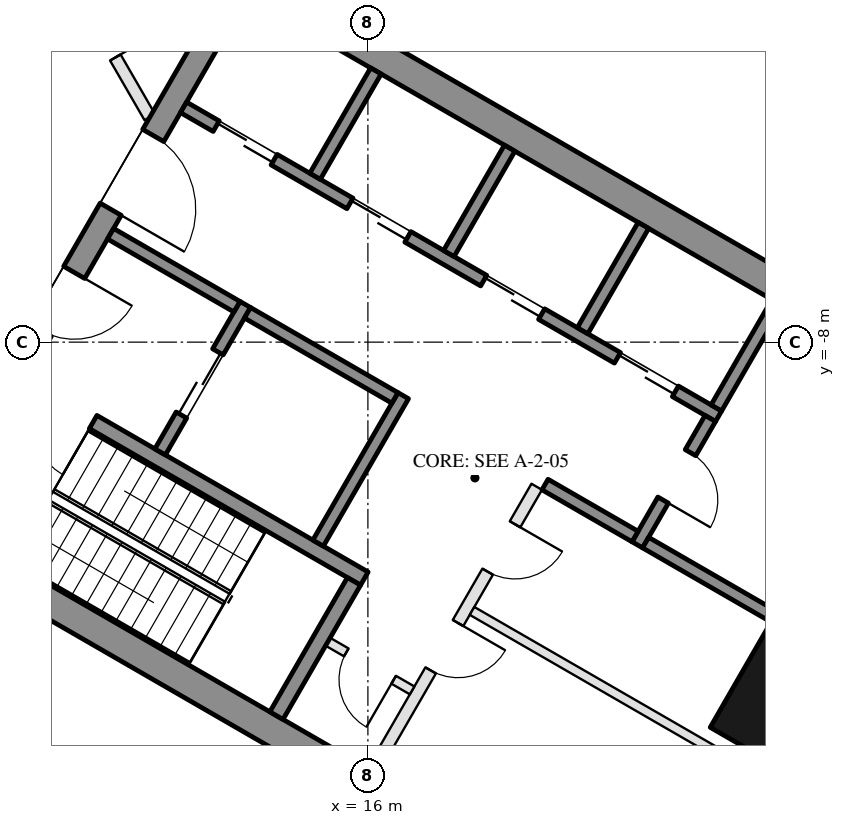
"""IFC4 building model, lengths in metres.
Left out: names, types, materials, properties, quantities, classifications, styles, units other than length and angle.
Written with IfcOpenShell. Run it as: python <this file> out.ifc"""

import sys

from ifc_helpers import new_model, si_unit, direction, frame, frame_2d, origin, origin_2d, place, context, subcontext, project, spatial, rectangle, hollow_rectangle, extrude, element, fill, save


model = new_model("IFC4")
c1 = context("Model", 3, precision=1e-05, world=origin(), true_north=direction((0.0, 1.0)))
c2 = subcontext(c1, "Body", "Model", "MODEL_VIEW")
j1 = project(units=[si_unit("LENGTHUNIT", "METRE"), si_unit("PLANEANGLEUNIT", "RADIAN")], contexts=[c1])
p1 = place(None, origin())
s1 = spatial("IfcSite", under=j1, at=p1, CompositionType="ELEMENT")
p2 = place(p1, origin())
s2 = spatial("IfcBuilding", under=s1, at=p2, CompositionType="ELEMENT")
p3 = place(p2, frame((0.0, 0.0, 28.5)))
s3 = spatial("IfcBuildingStorey", under=s2, at=p3, CompositionType="ELEMENT", Elevation=28.5)
p4 = place(p3, frame((23.556, -13.6, 0.0), z_axis=(0.0, 0.0, 1.0), x_axis=(0.5, 0.866025403784, 0.0)))
e1 = element("IfcColumn", 1, at=p4, inside=s3, PredefinedType="COLUMN", context=c2, shape_type="SweptSolid", body=[
    extrude(hollow_rectangle(XDim=3.2, YDim=2.6, WallThickness=0.08, at=origin_2d()), origin(), (0.0, 0.0, 1.0), 4.5),
])
for number, where, z_axis, x_axis in (
    (2, (8.547, -10.997, 0.0), (0.0, 0.0, 1.0), (0.866, -0.5, 0.0)),
    (3, (13.797, -1.903, 0.0), (0.0, 0.0, 1.0), (0.866, -0.5, 0.0)),
):
    element("IfcWall", number, at=place(p3, frame(where, z_axis=z_axis, x_axis=x_axis)), inside=s3, PredefinedType="SHEAR", context=c2, shape_type="SweptSolid", body=[
        extrude(rectangle(XDim=15.13, YDim=0.5, at=frame_2d((7.565, 0.0))), origin(), (0.0, 0.0, 1.0), 4.2),
    ])
p5 = place(p3, frame((8.845, -10.88, 0.0), z_axis=(0.0, 0.0, 1.0), x_axis=(0.500004234368, 0.866022959057, 0.0)))
e4 = element("IfcWall", 4, at=p5, inside=s3, PredefinedType="SHEAR", context=c2, shape_type="SweptSolid", body=[
    extrude(rectangle(XDim=10.0, YDim=0.4, at=frame_2d((5.0, 0.0))), origin(), (0.0, 0.0, 1.0), 4.2),
])
p6 = place(p5, frame((3.55, 0.0, 0.0)))
e5 = element("IfcOpeningElement", 5, at=p6, cuts=e4, PredefinedType="OPENING", context=c2, shape_type="SweptSolid", body=[
    extrude(rectangle(XDim=1.1, YDim=2.1, at=frame_2d((0.55, 1.05))), frame((0.0, 0.21, 0.0), z_axis=(0.0, -1.0, 0.0), x_axis=(1.0, 0.0, 0.0)), (0.0, 0.0, 1.0), 0.42),
])
p7 = place(p5, frame((5.85, 0.0, 0.0)))
e6 = element("IfcOpeningElement", 6, at=p7, cuts=e4, PredefinedType="OPENING", context=c2, shape_type="SweptSolid", body=[
    extrude(rectangle(XDim=1.4, YDim=2.1, at=frame_2d((0.7, 1.05))), frame((0.0, 0.21, 0.0), z_axis=(0.0, -1.0, 0.0), x_axis=(1.0, 0.0, 0.0)), (0.0, 0.0, 1.0), 0.42),
])
p8 = place(p3, frame((10.356, -8.664, 0.0), z_axis=(0.0, 0.0, 1.0), x_axis=(0.866028629588, -0.499994412703, 0.0)))
e7 = element("IfcWall", 7, at=p8, inside=s3, PredefinedType="SHEAR", context=c2, shape_type="SweptSolid", body=[
    extrude(rectangle(XDim=6.45, YDim=0.25, at=frame_2d((3.225, 0.0))), origin(), (0.0, 0.0, 1.0), 4.2),
])
p9 = place(p8, frame((0.3, 0.0, 0.0)))
e8 = element("IfcOpeningElement", 8, at=p9, cuts=e7, PredefinedType="OPENING", context=c2, shape_type="SweptSolid", body=[
    extrude(rectangle(XDim=1.0, YDim=2.1, at=frame_2d((0.5, 1.05))), frame((0.0, 0.135, 0.0), z_axis=(0.0, -1.0, 0.0), x_axis=(1.0, 0.0, 0.0)), (0.0, 0.0, 1.0), 0.27),
])
p10 = place(p3, frame((14.496, -14.143, 0.0), z_axis=(0.0, 0.0, 1.0), x_axis=(0.500062241894, 0.865989465428, 0.0)))
e9 = element("IfcWall", 9, at=p10, inside=s3, PredefinedType="SHEAR", context=c2, shape_type="SweptSolid", body=[
    extrude(rectangle(XDim=2.55, YDim=0.25, at=frame_2d((1.275, 0.0))), origin(), (0.0, 0.0, 1.0), 4.2),
])
p11 = place(p3, frame((15.181, -11.305, 0.0), z_axis=(0.0, 0.0, 1.0), x_axis=(0.49994636267, 0.866056369097, 0.0)))
e10 = element("IfcWall", 10, at=p11, inside=s3, PredefinedType="SHEAR", context=c2, shape_type="SweptSolid", body=[
    extrude(rectangle(XDim=2.8, YDim=0.2, at=frame_2d((1.4, 0.0))), origin(), (0.0, 0.0, 1.0), 4.2),
])
p12 = place(p3, frame((12.583, -9.805, 0.0), z_axis=(0.0, 0.0, 1.0), x_axis=(0.49994636267, 0.866056369097, 0.0)))
e11 = element("IfcWall", 11, at=p12, inside=s3, PredefinedType="SHEAR", context=c2, shape_type="SweptSolid", body=[
    extrude(rectangle(XDim=2.8, YDim=0.2, at=frame_2d((1.4, 0.0))), origin(), (0.0, 0.0, 1.0), 4.2),
])
p13 = place(p12, frame((0.7, 0.0, 0.0)))
e12 = element("IfcOpeningElement", 12, at=p13, cuts=e11, PredefinedType="OPENING", context=c2, shape_type="SweptSolid", body=[
    extrude(rectangle(XDim=1.2, YDim=2.1, at=frame_2d((0.6, 1.05))), frame((0.0, 0.11, 0.0), z_axis=(0.0, -1.0, 0.0), x_axis=(1.0, 0.0, 0.0)), (0.0, 0.0, 1.0), 0.22),
])
p14 = place(p3, frame((11.768, -6.217, 0.0), z_axis=(0.0, 0.0, 1.0), x_axis=(0.866050077142, -0.499957262057, 0.0)))
e13 = element("IfcWall", 13, at=p14, inside=s3, PredefinedType="SHEAR", context=c2, shape_type="SweptSolid", body=[
    extrude(rectangle(XDim=2.4, YDim=0.2, at=frame_2d((1.2, 0.0))), origin(), (0.0, 0.0, 1.0), 4.2),
])
p15 = place(p3, frame((14.02, -7.517, 0.0), z_axis=(0.0, 0.0, 1.0), x_axis=(0.866034573852, -0.49998411664, 0.0)))
e14 = element("IfcWall", 14, at=p15, inside=s3, PredefinedType="SHEAR", context=c2, shape_type="SweptSolid", body=[
    extrude(rectangle(XDim=2.8, YDim=0.2, at=frame_2d((1.4, 0.0))), origin(), (0.0, 0.0, 1.0), 4.2),
])
p16 = place(p3, frame((12.968, -4.138, 0.0), z_axis=(0.0, 0.0, 1.0), x_axis=(0.866028328073, -0.49999493495, 0.0)))
e15 = element("IfcWall", 15, at=p16, inside=s3, PredefinedType="SHEAR", context=c2, shape_type="SweptSolid", body=[
    extrude(rectangle(XDim=10.16, YDim=0.2, at=frame_2d((5.08, 0.0))), origin(), (0.0, 0.0, 1.0), 4.2),
])
p17 = place(p16, frame((0.62, 0.0, 0.0)))
e16 = element("IfcOpeningElement", 16, at=p17, cuts=e15, PredefinedType="OPENING", context=c2, shape_type="SweptSolid", body=[
    extrude(rectangle(XDim=1.1, YDim=2.1, at=frame_2d((0.55, 1.05))), frame((0.0, 0.11, 0.0), z_axis=(0.0, -1.0, 0.0), x_axis=(1.0, 0.0, 0.0)), (0.0, 0.0, 1.0), 0.22),
])
p18 = place(p16, frame((3.16, 0.0, 0.0)))
e17 = element("IfcOpeningElement", 17, at=p18, cuts=e15, PredefinedType="OPENING", context=c2, shape_type="SweptSolid", body=[
    extrude(rectangle(XDim=1.1, YDim=2.1, at=frame_2d((0.55, 1.05))), frame((0.0, 0.11, 0.0), z_axis=(0.0, -1.0, 0.0), x_axis=(1.0, 0.0, 0.0)), (0.0, 0.0, 1.0), 0.22),
])
p19 = place(p16, frame((5.7, 0.0, 0.0)))
e18 = element("IfcOpeningElement", 18, at=p19, cuts=e15, PredefinedType="OPENING", context=c2, shape_type="SweptSolid", body=[
    extrude(rectangle(XDim=1.1, YDim=2.1, at=frame_2d((0.55, 1.05))), frame((0.0, 0.11, 0.0), z_axis=(0.0, -1.0, 0.0), x_axis=(1.0, 0.0, 0.0)), (0.0, 0.0, 1.0), 0.22),
])
p20 = place(p16, frame((8.24, 0.0, 0.0)))
e19 = element("IfcOpeningElement", 19, at=p20, cuts=e15, PredefinedType="OPENING", context=c2, shape_type="SweptSolid", body=[
    extrude(rectangle(XDim=1.1, YDim=2.1, at=frame_2d((0.55, 1.05))), frame((0.0, 0.11, 0.0), z_axis=(0.0, -1.0, 0.0), x_axis=(1.0, 0.0, 0.0)), (0.0, 0.0, 1.0), 0.22),
])
p21 = place(p3, frame((20.43, -11.333, 0.0), z_axis=(0.0, 0.0, 1.0), x_axis=(0.500001309137, 0.866024647952, 0.0)))
e20 = element("IfcWall", 20, at=p21, inside=s3, PredefinedType="SHEAR", context=c2, shape_type="SweptSolid", body=[
    extrude(rectangle(XDim=2.4, YDim=0.2, at=frame_2d((1.2, 0.0))), origin(), (0.0, 0.0, 1.0), 4.2),
])
p22 = place(p21, frame((0.85, 0.0, 0.0)))
e21 = element("IfcOpeningElement", 21, at=p22, cuts=e20, PredefinedType="OPENING", context=c2, shape_type="SweptSolid", body=[
    extrude(rectangle(XDim=0.9, YDim=2.1, at=frame_2d((0.45, 1.05))), frame((0.0, 0.11, 0.0), z_axis=(0.0, -1.0, 0.0), x_axis=(1.0, 0.0, 0.0)), (0.0, 0.0, 1.0), 0.22),
])
p23 = place(p3, frame((18.913, -10.342, 0.0), z_axis=(0.0, 0.0, 1.0), x_axis=(0.866038183914, -0.499977863513, 0.0)))
e22 = element("IfcWall", 22, at=p23, inside=s3, PredefinedType="SHEAR", context=c2, shape_type="SweptSolid", body=[
    extrude(rectangle(XDim=1.71, YDim=0.2, at=frame_2d((0.855, 0.0))), origin(), (0.0, 0.0, 1.0), 4.2),
])
for number, where, z_axis, x_axis in (
    (23, (15.131, -5.272, 0.0), (0.0, 0.0, 1.0), (0.5, 0.866, 0.0)),
    (24, (17.331, -6.542, 0.0), (0.0, 0.0, 1.0), (0.5, 0.866, 0.0)),
    (25, (19.531, -7.812, 0.0), (0.0, 0.0, 1.0), (0.5, 0.866, 0.0)),
    (26, (21.73, -9.082, 0.0), (0.0, 0.0, 1.0), (0.5, 0.866, 0.0)),
):
    element("IfcWall", number, at=place(p3, frame(where, z_axis=z_axis, x_axis=x_axis)), inside=s3, PredefinedType="SHEAR", context=c2, shape_type="SweptSolid", body=[
        extrude(rectangle(XDim=2.0, YDim=0.2, at=frame_2d((1.0, 0.0))), origin(), (0.0, 0.0, 1.0), 4.2),
    ])
p24 = place(p3, frame((20.567, -11.297, 0.0), z_axis=(0.0, 0.0, 1.0), x_axis=(0.866048967903, -0.499959183527, 0.0)))
e27 = element("IfcWall", 27, at=p24, inside=s3, PredefinedType="SHEAR", context=c2, shape_type="SweptSolid", body=[
    extrude(rectangle(XDim=2.44, YDim=0.2, at=frame_2d((1.22, 0.0))), origin(), (0.0, 0.0, 1.0), 4.2),
])
p25 = place(p3, frame((16.076, -15.055, 0.0), z_axis=(0.0, 0.0, 1.0), x_axis=(0.499995103361, 0.866028230842, 0.0)))
e28 = element("IfcWall", 28, at=p25, inside=s3, PredefinedType="PARTITIONING", context=c2, shape_type="SweptSolid", body=[
    extrude(rectangle(XDim=5.4, YDim=0.2, at=frame_2d((2.7, 0.0))), origin(), (0.0, 0.0, 1.0), 4.2),
])
p26 = place(p25, frame((1.913, 0.0, 0.0)))
e29 = element("IfcOpeningElement", 29, at=p26, cuts=e28, PredefinedType="OPENING", context=c2, shape_type="SweptSolid", body=[
    extrude(rectangle(XDim=0.9, YDim=2.1, at=frame_2d((0.45, 1.05))), frame((0.0, 0.11, 0.0), z_axis=(0.0, -1.0, 0.0), x_axis=(1.0, 0.0, 0.0)), (0.0, 0.0, 1.0), 0.22),
])
p27 = place(p25, frame((3.788, 0.0, 0.0)))
e30 = element("IfcOpeningElement", 30, at=p27, cuts=e28, PredefinedType="OPENING", context=c2, shape_type="SweptSolid", body=[
    extrude(rectangle(XDim=0.9, YDim=2.1, at=frame_2d((0.45, 1.05))), frame((0.0, 0.11, 0.0), z_axis=(0.0, -1.0, 0.0), x_axis=(1.0, 0.0, 0.0)), (0.0, 0.0, 1.0), 0.22),
])
p28 = place(p3, frame((15.342, -12.928, 0.0), z_axis=(0.0, 0.0, 1.0), x_axis=(0.865989903783, -0.500061482766, 0.0)))
e31 = element("IfcWall", 31, at=p28, inside=s3, PredefinedType="PARTITIONING", context=c2, shape_type="SweptSolid", body=[
    extrude(rectangle(XDim=1.6, YDim=0.15, at=frame_2d((0.8, 0.0))), origin(), (0.0, 0.0, 1.0), 4.2),
])
p29 = place(p28, frame((0.35, 0.0, 0.0)))
e32 = element("IfcOpeningElement", 32, at=p29, cuts=e31, PredefinedType="OPENING", context=c2, shape_type="SweptSolid", body=[
    extrude(rectangle(XDim=0.9, YDim=2.1, at=frame_2d((0.45, 1.05))), frame((0.0, 0.085, 0.0), z_axis=(0.0, -1.0, 0.0), x_axis=(1.0, 0.0, 0.0)), (0.0, 0.0, 1.0), 0.17),
])
p30 = place(p3, frame((17.713, -12.42, 0.0), z_axis=(0.0, 0.0, 1.0), x_axis=(0.866027924134, -0.499995634601, 0.0)))
e33 = element("IfcWall", 33, at=p30, inside=s3, PredefinedType="PARTITIONING", context=c2, shape_type="SweptSolid", body=[
    extrude(rectangle(XDim=6.55, YDim=0.15, at=frame_2d((3.275, 0.0))), origin(), (0.0, 0.0, 1.0), 4.2),
])
p31 = place(p3, frame((12.413, -4.3, 0.0), z_axis=(0.0, 0.0, 1.0), x_axis=(-0.50000478328, 0.866022642139, 0.0)))
e34 = element("IfcWall", 34, at=p31, inside=s3, PredefinedType="PARTITIONING", context=c2, shape_type="SweptSolid", body=[
    extrude(rectangle(XDim=19.861, YDim=0.2, at=frame_2d((9.931, 0.0))), origin(), (0.0, 0.0, 1.0), 3.41),
])
p32 = place(p31, frame((1.134, 0.0, 0.0)))
e35 = element("IfcOpeningElement", 35, at=p32, cuts=e34, PredefinedType="OPENING", context=c2, shape_type="SweptSolid", body=[
    extrude(rectangle(XDim=1.2, YDim=2.1, at=frame_2d((0.6, 1.05))), frame((0.0, 0.11, 0.0), z_axis=(0.0, -1.0, 0.0), x_axis=(1.0, 0.0, 0.0)), (0.0, 0.0, 1.0), 0.22),
])
p33 = place(p31, frame((16.89, 0.0, 0.0)))
e36 = element("IfcOpeningElement", 36, at=p33, cuts=e34, PredefinedType="OPENING", context=c2, shape_type="SweptSolid", body=[
    extrude(rectangle(XDim=1.8, YDim=2.4, at=frame_2d((0.9, 1.2))), frame((0.0, 0.11, 0.0), z_axis=(0.0, -1.0, 0.0), x_axis=(1.0, 0.0, 0.0)), (0.0, 0.0, 1.0), 0.22),
])
p34 = place(p31, frame((13.23, 0.0, 0.0)))
e37 = element("IfcOpeningElement", 37, at=p34, cuts=e34, PredefinedType="OPENING", context=c2, shape_type="SweptSolid", body=[
    extrude(rectangle(XDim=1.8, YDim=2.1, at=frame_2d((0.9, 1.05))), frame((0.0, 0.11, 0.0), z_axis=(0.0, -1.0, 0.0), x_axis=(1.0, 0.0, 0.0)), (0.0, 0.0, 1.0), 0.22),
])
p35 = place(p31, frame((7.168, 0.0, 0.0)))
e38 = element("IfcOpeningElement", 38, at=p35, cuts=e34, PredefinedType="OPENING", context=c2, shape_type="SweptSolid", body=[
    extrude(rectangle(XDim=1.0, YDim=2.1, at=frame_2d((0.5, 1.05))), frame((0.0, 0.11, 0.0), z_axis=(0.0, -1.0, 0.0), x_axis=(1.0, 0.0, 0.0)), (0.0, 0.0, 1.0), 0.22),
])
p36 = place(p13, origin())
e39 = element("IfcDoor", 39, at=p36, inside=s3, OperationType="DOUBLE_DOOR_SLIDING", PredefinedType="DOOR", context=c2, shape_type="SweptSolid", body=[
    extrude(rectangle(XDim=1.2, YDim=2.1, at=frame_2d((0.6, 1.05))), frame((0.0, 0.025, 0.0), z_axis=(0.0, -1.0, 0.0), x_axis=(1.0, 0.0, 0.0)), (0.0, 0.0, 1.0), 0.05),
])
fill(e12, e39)
p37 = place(p29, frame((0.9, 0.0, 0.0), z_axis=(0.0, 0.0, 1.0), x_axis=(-1.0, 0.0, 0.0)))
e40 = element("IfcDoor", 40, at=p37, inside=s3, OperationType="SINGLE_SWING_LEFT", PredefinedType="DOOR", context=c2, shape_type="SweptSolid", body=[
    extrude(rectangle(XDim=0.9, YDim=2.1, at=frame_2d((0.45, 1.05))), frame((0.0, 0.025, 0.0), z_axis=(0.0, -1.0, 0.0), x_axis=(1.0, 0.0, 0.0)), (0.0, 0.0, 1.0), 0.05),
])
fill(e32, e40)
p38 = place(p17, origin())
e41 = element("IfcDoor", 41, at=p38, inside=s3, OperationType="DOUBLE_DOOR_SLIDING", PredefinedType="DOOR", context=c2, shape_type="SweptSolid", body=[
    extrude(rectangle(XDim=1.1, YDim=2.1, at=frame_2d((0.55, 1.05))), frame((0.0, 0.025, 0.0), z_axis=(0.0, -1.0, 0.0), x_axis=(1.0, 0.0, 0.0)), (0.0, 0.0, 1.0), 0.05),
])
fill(e16, e41)
p39 = place(p18, origin())
e42 = element("IfcDoor", 42, at=p39, inside=s3, OperationType="DOUBLE_DOOR_SLIDING", PredefinedType="DOOR", context=c2, shape_type="SweptSolid", body=[
    extrude(rectangle(XDim=1.1, YDim=2.1, at=frame_2d((0.55, 1.05))), frame((0.0, 0.025, 0.0), z_axis=(0.0, -1.0, 0.0), x_axis=(1.0, 0.0, 0.0)), (0.0, 0.0, 1.0), 0.05),
])
fill(e17, e42)
p40 = place(p19, origin())
e43 = element("IfcDoor", 43, at=p40, inside=s3, OperationType="DOUBLE_DOOR_SLIDING", PredefinedType="DOOR", context=c2, shape_type="SweptSolid", body=[
    extrude(rectangle(XDim=1.1, YDim=2.1, at=frame_2d((0.55, 1.05))), frame((0.0, 0.025, 0.0), z_axis=(0.0, -1.0, 0.0), x_axis=(1.0, 0.0, 0.0)), (0.0, 0.0, 1.0), 0.05),
])
fill(e18, e43)
p41 = place(p20, origin())
e44 = element("IfcDoor", 44, at=p41, inside=s3, OperationType="DOUBLE_DOOR_SLIDING", PredefinedType="DOOR", context=c2, shape_type="SweptSolid", body=[
    extrude(rectangle(XDim=1.1, YDim=2.1, at=frame_2d((0.55, 1.05))), frame((0.0, 0.025, 0.0), z_axis=(0.0, -1.0, 0.0), x_axis=(1.0, 0.0, 0.0)), (0.0, 0.0, 1.0), 0.05),
])
fill(e19, e44)
p42 = place(p22, frame((0.9, 0.0, 0.0), z_axis=(0.0, 0.0, 1.0), x_axis=(-1.0, 0.0, 0.0)))
e45 = element("IfcDoor", 45, at=p42, inside=s3, OperationType="SINGLE_SWING_RIGHT", PredefinedType="DOOR", context=c2, shape_type="SweptSolid", body=[
    extrude(rectangle(XDim=0.9, YDim=2.1, at=frame_2d((0.45, 1.05))), frame((0.0, 0.025, 0.0), z_axis=(0.0, -1.0, 0.0), x_axis=(1.0, 0.0, 0.0)), (0.0, 0.0, 1.0), 0.05),
])
fill(e21, e45)
p43 = place(p26, frame((0.9, 0.0, 0.0), z_axis=(0.0, 0.0, 1.0), x_axis=(-1.0, 0.0, 0.0)))
e46 = element("IfcDoor", 46, at=p43, inside=s3, OperationType="SINGLE_SWING_LEFT", PredefinedType="DOOR", context=c2, shape_type="SweptSolid", body=[
    extrude(rectangle(XDim=0.9, YDim=2.1, at=frame_2d((0.45, 1.05))), frame((0.0, 0.025, 0.0), z_axis=(0.0, -1.0, 0.0), x_axis=(1.0, 0.0, 0.0)), (0.0, 0.0, 1.0), 0.05),
])
fill(e29, e46)
p44 = place(p27, frame((0.9, 0.0, 0.0), z_axis=(0.0, 0.0, 1.0), x_axis=(-1.0, 0.0, 0.0)))
e47 = element("IfcDoor", 47, at=p44, inside=s3, OperationType="SINGLE_SWING_LEFT", PredefinedType="DOOR", context=c2, shape_type="SweptSolid", body=[
    extrude(rectangle(XDim=0.9, YDim=2.1, at=frame_2d((0.45, 1.05))), frame((0.0, 0.025, 0.0), z_axis=(0.0, -1.0, 0.0), x_axis=(1.0, 0.0, 0.0)), (0.0, 0.0, 1.0), 0.05),
])
fill(e30, e47)
p45 = place(p6, frame((1.1, 0.0, 0.0), z_axis=(0.0, 0.0, 1.0), x_axis=(-1.0, 0.0, 0.0)))
e48 = element("IfcDoor", 48, at=p45, inside=s3, OperationType="SINGLE_SWING_LEFT", PredefinedType="DOOR", context=c2, shape_type="SweptSolid", body=[
    extrude(rectangle(XDim=1.1, YDim=2.1, at=frame_2d((0.55, 1.05))), frame((0.0, 0.025, 0.0), z_axis=(0.0, -1.0, 0.0), x_axis=(1.0, 0.0, 0.0)), (0.0, 0.0, 1.0), 0.05),
])
fill(e5, e48)
p46 = place(p7, frame((1.4, 0.0, 0.0), z_axis=(0.0, 0.0, 1.0), x_axis=(-1.0, 0.0, 0.0)))
e49 = element("IfcDoor", 49, at=p46, inside=s3, OperationType="DOUBLE_DOOR_SINGLE_SWING", PredefinedType="DOOR", context=c2, shape_type="SweptSolid", body=[
    extrude(rectangle(XDim=1.4, YDim=2.1, at=frame_2d((0.7, 1.05))), frame((0.0, 0.025, 0.0), z_axis=(0.0, -1.0, 0.0), x_axis=(1.0, 0.0, 0.0)), (0.0, 0.0, 1.0), 0.05),
])
fill(e6, e49)
p47 = place(p9, frame((1.0, 0.0, 0.0), z_axis=(0.0, 0.0, 1.0), x_axis=(-1.0, 0.0, 0.0)))
e50 = element("IfcDoor", 50, at=p47, inside=s3, OperationType="SINGLE_SWING_LEFT", PredefinedType="DOOR", context=c2, shape_type="SweptSolid", body=[
    extrude(rectangle(XDim=1.0, YDim=2.1, at=frame_2d((0.5, 1.05))), frame((0.0, 0.025, 0.0), z_axis=(0.0, -1.0, 0.0), x_axis=(1.0, 0.0, 0.0)), (0.0, 0.0, 1.0), 0.05),
])
fill(e8, e50)
p48 = place(p32, frame((1.2, 0.0, 0.0), z_axis=(0.0, 0.0, 1.0), x_axis=(-1.0, 0.0, 0.0)))
e51 = element("IfcDoor", 51, at=p48, inside=s3, OperationType="SINGLE_SWING_RIGHT", PredefinedType="DOOR", context=c2, shape_type="SweptSolid", body=[
    extrude(rectangle(XDim=1.2, YDim=2.1, at=frame_2d((0.6, 1.05))), frame((0.0, 0.025, 0.0), z_axis=(0.0, -1.0, 0.0), x_axis=(1.0, 0.0, 0.0)), (0.0, 0.0, 1.0), 0.05),
])
fill(e35, e51)
save(model, sys.argv[1])
